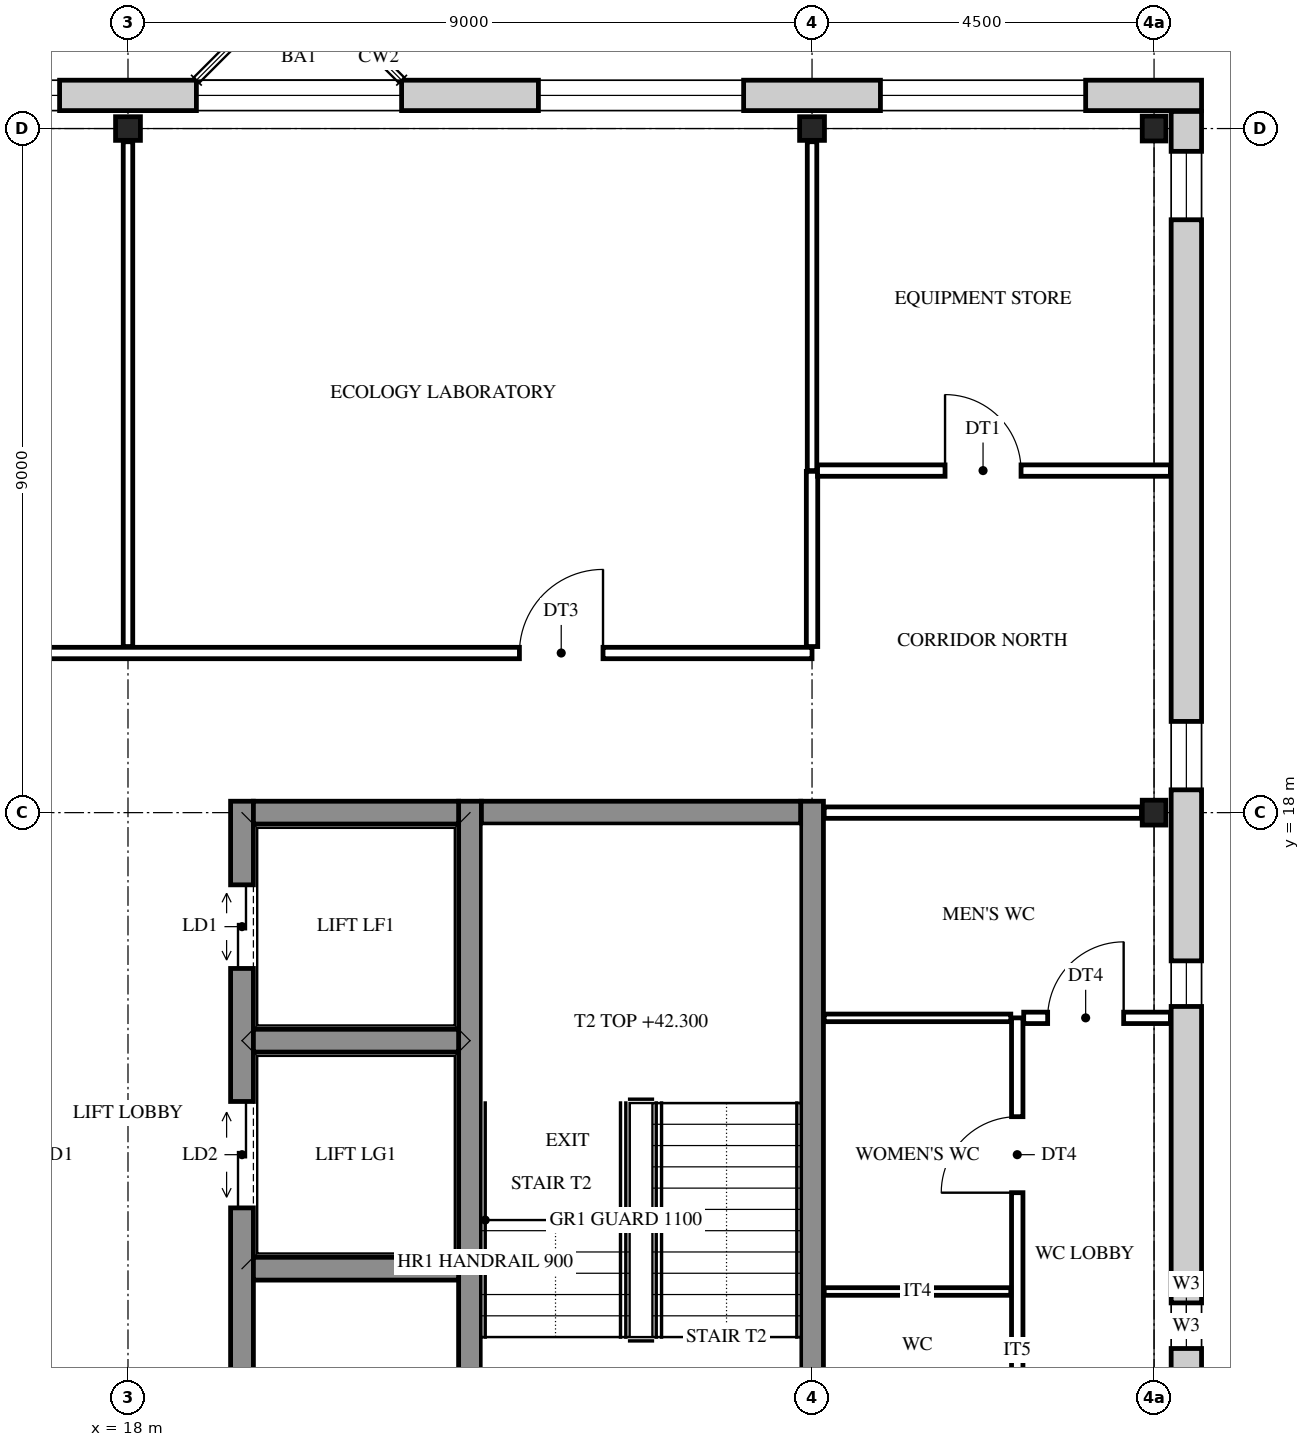
"""IFC4 building model, lengths in metres.
Left out: names, types, materials, properties, quantities, classifications, styles, units other than length and angle.
Written with IfcOpenShell. Run it as: python <this file> out.ifc"""

import sys

from ifc_helpers import new_model, si_unit, direction, frame, frame_2d, origin, origin_2d, place, context, subcontext, project, spatial, rectangle, i_section, extrude, element, fill, save


model = new_model("IFC4")
c1 = context("Model", 3, precision=1e-05, world=origin(), true_north=direction((0.0, 1.0)))
c2 = subcontext(c1, "Body", "Model", "MODEL_VIEW")
j1 = project(units=[si_unit("LENGTHUNIT", "METRE"), si_unit("PLANEANGLEUNIT", "RADIAN")], contexts=[c1])
p1 = place(None, origin())
s1 = spatial("IfcSite", under=j1, at=p1, CompositionType="ELEMENT")
p2 = place(p1, origin())
s2 = spatial("IfcBuilding", under=s1, at=p2, CompositionType="ELEMENT")
p3 = place(p2, frame((0.0, 0.0, 40.2)))
s3 = spatial("IfcBuildingStorey", under=s2, at=p3, CompositionType="ELEMENT", Elevation=40.2)
for number, where, z_axis, x_axis in (
    (1, (18.0, 27.0, 0.0), (0.0, 0.0, 1.0), (0.0, 1.0, 0.0)),
    (2, (27.0, 27.0, 0.0), (0.0, 0.0, 1.0), (0.0, 1.0, 0.0)),
    (3, (31.5, 18.0, 0.0), (0.0, 0.0, 1.0), (1.0, 0.0, 0.0)),
    (4, (31.5, 27.0, 0.0), (0.0, 0.0, 1.0), (1.0, 0.0, 0.0)),
):
    element("IfcColumn", number, at=place(p3, frame(where, z_axis=z_axis, x_axis=x_axis)), inside=s3, PredefinedType="COLUMN", context=c2, shape_type="SweptSolid", body=[
        extrude(i_section(OverallWidth=0.311, OverallDepth=0.327, WebThickness=0.016, FlangeThickness=0.025, FilletRadius=0.017, at=origin_2d()), origin(), (0.0, 0.0, 1.0), 4.2),
    ])
p4 = place(p3, frame((19.5, 8.85, 0.0), z_axis=(0.0, 0.0, 1.0), x_axis=(0.0, 1.0, 0.0)))
e5 = element("IfcWall", 5, at=p4, inside=s3, PredefinedType="SHEAR", context=c2, shape_type="SweptSolid", body=[
    extrude(rectangle(XDim=9.3, YDim=0.3, at=frame_2d((4.65, 0.0))), origin(), (0.0, 0.0, 1.0), 4.2),
])
p5 = place(p4, frame((3.95, 0.0, 0.0)))
e6 = element("IfcOpeningElement", 6, at=p5, cuts=e5, PredefinedType="OPENING", context=c2, shape_type="SweptSolid", body=[
    extrude(rectangle(XDim=1.4, YDim=2.1, at=frame_2d((0.7, 1.05))), frame((0.0, 0.16, 0.0), z_axis=(0.0, -1.0, 0.0), x_axis=(1.0, 0.0, 0.0)), (0.0, 0.0, 1.0), 0.32),
])
p6 = place(p4, frame((7.1, 0.0, 0.0)))
e7 = element("IfcOpeningElement", 7, at=p6, cuts=e5, PredefinedType="OPENING", context=c2, shape_type="SweptSolid", body=[
    extrude(rectangle(XDim=1.1, YDim=2.1, at=frame_2d((0.55, 1.05))), frame((0.0, 0.16, 0.0), z_axis=(0.0, -1.0, 0.0), x_axis=(1.0, 0.0, 0.0)), (0.0, 0.0, 1.0), 0.32),
])
for number, where, z_axis, x_axis in (
    (8, (22.5, 8.85, 0.0), (0.0, 0.0, 1.0), (0.0, 1.0, 0.0)),
    (9, (27.0, 8.85, 0.0), (0.0, 0.0, 1.0), (0.0, 1.0, 0.0)),
):
    element("IfcWall", number, at=place(p3, frame(where, z_axis=z_axis, x_axis=x_axis)), inside=s3, PredefinedType="SHEAR", context=c2, shape_type="SweptSolid", body=[
        extrude(rectangle(XDim=9.3, YDim=0.3, at=frame_2d((4.65, 0.0))), origin(), (0.0, 0.0, 1.0), 4.2),
    ])
for number, where, z_axis, x_axis in (
    (10, (19.65, 12.0, 0.0), (0.0, 0.0, 1.0), (1.0, 0.0, 0.0)),
    (11, (19.65, 15.0, 0.0), (0.0, 0.0, 1.0), (1.0, 0.0, 0.0)),
    (12, (19.65, 18.0, 0.0), (0.0, 0.0, 1.0), (1.0, 0.0, 0.0)),
):
    element("IfcWall", number, at=place(p3, frame(where, z_axis=z_axis, x_axis=x_axis)), inside=s3, PredefinedType="SHEAR", context=c2, shape_type="SweptSolid", body=[
        extrude(rectangle(XDim=2.7, YDim=0.3, at=frame_2d((1.35, 0.0))), origin(), (0.0, 0.0, 1.0), 4.2),
    ])
p7 = place(p3, frame((22.65, 18.0, 0.0), z_axis=(0.0, 0.0, 1.0), x_axis=(1.0, 0.0, 0.0)))
e13 = element("IfcWall", 13, at=p7, inside=s3, PredefinedType="SHEAR", context=c2, shape_type="SweptSolid", body=[
    extrude(rectangle(XDim=4.2, YDim=0.3, at=frame_2d((2.1, 0.0))), origin(), (0.0, 0.0, 1.0), 4.2),
])
p8 = place(p3, frame((-0.625, 27.436, 0.0), z_axis=(0.0, 0.0, 1.0), x_axis=(1.0, 0.0, 0.0)))
e14 = element("IfcWall", 14, at=p8, inside=s3, PredefinedType="STANDARD", context=c2, shape_type="SweptSolid", body=[
    extrude(rectangle(XDim=32.75, YDim=0.4, at=frame_2d((16.375, 0.0))), origin(), (0.0, 0.0, 1.0), 4.2),
])
p9 = place(p8, frame((1.525, 0.0, 0.9)))
e15 = element("IfcOpeningElement", 15, at=p9, cuts=e14, PredefinedType="OPENING", context=c2, shape_type="SweptSolid", body=[
    extrude(rectangle(XDim=2.7, YDim=2.5, at=frame_2d((1.35, 1.25))), frame((0.0, 0.21, 0.0), z_axis=(0.0, -1.0, 0.0), x_axis=(1.0, 0.0, 0.0)), (0.0, 0.0, 1.0), 0.42),
])
p10 = place(p8, frame((6.025, 0.0, 0.9)))
e16 = element("IfcOpeningElement", 16, at=p10, cuts=e14, PredefinedType="OPENING", context=c2, shape_type="SweptSolid", body=[
    extrude(rectangle(XDim=2.7, YDim=2.5, at=frame_2d((1.35, 1.25))), frame((0.0, 0.21, 0.0), z_axis=(0.0, -1.0, 0.0), x_axis=(1.0, 0.0, 0.0)), (0.0, 0.0, 1.0), 0.42),
])
p11 = place(p8, frame((10.525, 0.0, 0.9)))
e17 = element("IfcOpeningElement", 17, at=p11, cuts=e14, PredefinedType="OPENING", context=c2, shape_type="SweptSolid", body=[
    extrude(rectangle(XDim=2.7, YDim=2.5, at=frame_2d((1.35, 1.25))), frame((0.0, 0.21, 0.0), z_axis=(0.0, -1.0, 0.0), x_axis=(1.0, 0.0, 0.0)), (0.0, 0.0, 1.0), 0.42),
])
p12 = place(p8, frame((15.025, 0.0, 0.9)))
e18 = element("IfcOpeningElement", 18, at=p12, cuts=e14, PredefinedType="OPENING", context=c2, shape_type="SweptSolid", body=[
    extrude(rectangle(XDim=2.7, YDim=2.5, at=frame_2d((1.35, 1.25))), frame((0.0, 0.21, 0.0), z_axis=(0.0, -1.0, 0.0), x_axis=(1.0, 0.0, 0.0)), (0.0, 0.0, 1.0), 0.42),
])
p13 = place(p8, frame((19.525, 0.0, 0.9)))
e19 = element("IfcOpeningElement", 19, at=p13, cuts=e14, PredefinedType="OPENING", context=c2, shape_type="SweptSolid", body=[
    extrude(rectangle(XDim=2.7, YDim=2.5, at=frame_2d((1.35, 1.25))), frame((0.0, 0.21, 0.0), z_axis=(0.0, -1.0, 0.0), x_axis=(1.0, 0.0, 0.0)), (0.0, 0.0, 1.0), 0.42),
])
p14 = place(p8, frame((24.025, 0.0, 0.9)))
e20 = element("IfcOpeningElement", 20, at=p14, cuts=e14, PredefinedType="OPENING", context=c2, shape_type="SweptSolid", body=[
    extrude(rectangle(XDim=2.7, YDim=2.5, at=frame_2d((1.35, 1.25))), frame((0.0, 0.21, 0.0), z_axis=(0.0, -1.0, 0.0), x_axis=(1.0, 0.0, 0.0)), (0.0, 0.0, 1.0), 0.42),
])
p15 = place(p8, frame((28.525, 0.0, 0.9)))
e21 = element("IfcOpeningElement", 21, at=p15, cuts=e14, PredefinedType="OPENING", context=c2, shape_type="SweptSolid", body=[
    extrude(rectangle(XDim=2.7, YDim=2.5, at=frame_2d((1.35, 1.25))), frame((0.0, 0.21, 0.0), z_axis=(0.0, -1.0, 0.0), x_axis=(1.0, 0.0, 0.0)), (0.0, 0.0, 1.0), 0.42),
])
p16 = place(p3, frame((31.925, 27.225, 0.0), z_axis=(0.0, 0.0, 1.0), x_axis=(0.0, -1.0, 0.0)))
e22 = element("IfcWall", 22, at=p16, inside=s3, PredefinedType="STANDARD", context=c2, shape_type="SweptSolid", body=[
    extrude(rectangle(XDim=27.45, YDim=0.4, at=frame_2d((13.725, 0.0))), origin(), (0.0, 0.0, 1.0), 4.2),
])
p17 = place(p16, frame((26.025, 0.0, 0.9)))
e23 = element("IfcOpeningElement", 23, at=p17, cuts=e22, PredefinedType="OPENING", context=c2, shape_type="SweptSolid", body=[
    extrude(rectangle(XDim=0.9, YDim=2.0, at=frame_2d((0.45, 1.0))), frame((0.0, 0.21, 0.0), z_axis=(0.0, -1.0, 0.0), x_axis=(1.0, 0.0, 0.0)), (0.0, 0.0, 1.0), 0.42),
])
p18 = place(p16, frame((18.525, 0.0, 0.9)))
e24 = element("IfcOpeningElement", 24, at=p18, cuts=e22, PredefinedType="OPENING", context=c2, shape_type="SweptSolid", body=[
    extrude(rectangle(XDim=0.9, YDim=2.0, at=frame_2d((0.45, 1.0))), frame((0.0, 0.21, 0.0), z_axis=(0.0, -1.0, 0.0), x_axis=(1.0, 0.0, 0.0)), (0.0, 0.0, 1.0), 0.42),
])
p19 = place(p16, frame((15.675, 0.0, 1.6)))
e25 = element("IfcOpeningElement", 25, at=p19, cuts=e22, PredefinedType="OPENING", context=c2, shape_type="SweptSolid", body=[
    extrude(rectangle(XDim=0.6, YDim=0.9, at=frame_2d((0.3, 0.45))), frame((0.0, 0.21, 0.0), z_axis=(0.0, -1.0, 0.0), x_axis=(1.0, 0.0, 0.0)), (0.0, 0.0, 1.0), 0.42),
])
p20 = place(p16, frame((11.175, 0.0, 1.6)))
e26 = element("IfcOpeningElement", 26, at=p20, cuts=e22, PredefinedType="OPENING", context=c2, shape_type="SweptSolid", body=[
    extrude(rectangle(XDim=0.6, YDim=0.9, at=frame_2d((0.3, 0.45))), frame((0.0, 0.21, 0.0), z_axis=(0.0, -1.0, 0.0), x_axis=(1.0, 0.0, 0.0)), (0.0, 0.0, 1.0), 0.42),
])
p21 = place(p16, frame((8.025, 0.0, 0.9)))
e27 = element("IfcOpeningElement", 27, at=p21, cuts=e22, PredefinedType="OPENING", context=c2, shape_type="SweptSolid", body=[
    extrude(rectangle(XDim=0.9, YDim=2.0, at=frame_2d((0.45, 1.0))), frame((0.0, 0.21, 0.0), z_axis=(0.0, -1.0, 0.0), x_axis=(1.0, 0.0, 0.0)), (0.0, 0.0, 1.0), 0.42),
])
p22 = place(p16, frame((0.525, 0.0, 0.9)))
e28 = element("IfcOpeningElement", 28, at=p22, cuts=e22, PredefinedType="OPENING", context=c2, shape_type="SweptSolid", body=[
    extrude(rectangle(XDim=0.9, YDim=2.0, at=frame_2d((0.45, 1.0))), frame((0.0, 0.21, 0.0), z_axis=(0.0, -1.0, 0.0), x_axis=(1.0, 0.0, 0.0)), (0.0, 0.0, 1.0), 0.42),
])
p23 = place(p3, frame((18.0, 20.185, 0.0), z_axis=(0.0, 0.0, 1.0), x_axis=(0.0, 1.0, 0.0)))
e29 = element("IfcWall", 29, at=p23, inside=s3, PredefinedType="PARTITIONING", context=c2, shape_type="SweptSolid", body=[
    extrude(rectangle(XDim=6.641, YDim=0.125, at=frame_2d((3.321, 0.0))), origin(), (0.0, 0.0, 1.0), 3.537),
])
p24 = place(p3, frame((27.0, 20.185, 0.0), z_axis=(0.0, 0.0, 1.0), x_axis=(0.0, 1.0, 0.0)))
e30 = element("IfcWall", 30, at=p24, inside=s3, PredefinedType="PARTITIONING", context=c2, shape_type="SweptSolid", body=[
    extrude(rectangle(XDim=2.305, YDim=0.15, at=frame_2d((1.152, 0.0))), origin(), (0.0, 0.0, 1.0), 3.537),
])
p25 = place(p3, frame((27.0, 22.5, 0.0), z_axis=(0.0, 0.0, 1.0), x_axis=(0.0, 1.0, 0.0)))
e31 = element("IfcWall", 31, at=p25, inside=s3, PredefinedType="PARTITIONING", context=c2, shape_type="SweptSolid", body=[
    extrude(rectangle(XDim=4.326, YDim=0.125, at=frame_2d((2.163, 0.0))), origin(), (0.0, 0.0, 1.0), 3.537),
])
p26 = place(p3, frame((29.7, 9.0, 0.0), z_axis=(0.0, 0.0, 1.0), x_axis=(0.0, 1.0, 0.0)))
e32 = element("IfcWall", 32, at=p26, inside=s3, PredefinedType="PARTITIONING", context=c2, shape_type="SweptSolid", body=[
    extrude(rectangle(XDim=6.3, YDim=0.15, at=frame_2d((3.15, 0.0))), origin(), (0.0, 0.0, 1.0), 3.537),
])
p27 = place(p26, frame((4.0, 0.0, 0.0)))
e33 = element("IfcOpeningElement", 33, at=p27, cuts=e32, PredefinedType="OPENING", context=c2, shape_type="SweptSolid", body=[
    extrude(rectangle(XDim=1.0, YDim=2.1, at=frame_2d((0.5, 1.05))), frame((0.0, 0.085, 0.0), z_axis=(0.0, -1.0, 0.0), x_axis=(1.0, 0.0, 0.0)), (0.0, 0.0, 1.0), 0.17),
])
for number, where, z_axis, x_axis in (
    (34, (27.16, 11.7, 0.0), (0.0, 0.0, 1.0), (1.0, 0.0, 0.0)),
    (35, (27.16, 15.3, 0.0), (0.0, 0.0, 1.0), (1.0, 0.0, 0.0)),
):
    element("IfcWall", number, at=place(p3, frame(where, z_axis=z_axis, x_axis=x_axis)), inside=s3, PredefinedType="PARTITIONING", context=c2, shape_type="SweptSolid", body=[
        extrude(rectangle(XDim=2.455, YDim=0.1, at=frame_2d((1.228, 0.0))), origin(), (0.0, 0.0, 1.0), 3.537),
    ])
p28 = place(p3, frame((29.785, 15.3, 0.0), z_axis=(0.0, 0.0, 1.0), x_axis=(1.0, 0.0, 0.0)))
e36 = element("IfcWall", 36, at=p28, inside=s3, PredefinedType="PARTITIONING", context=c2, shape_type="SweptSolid", body=[
    extrude(rectangle(XDim=1.93, YDim=0.15, at=frame_2d((0.965, 0.0))), origin(), (0.0, 0.0, 1.0), 3.537),
])
p29 = place(p28, frame((0.315, 0.0, 0.0)))
e37 = element("IfcOpeningElement", 37, at=p29, cuts=e36, PredefinedType="OPENING", context=c2, shape_type="SweptSolid", body=[
    extrude(rectangle(XDim=1.0, YDim=2.1, at=frame_2d((0.5, 1.05))), frame((0.0, 0.085, 0.0), z_axis=(0.0, -1.0, 0.0), x_axis=(1.0, 0.0, 0.0)), (0.0, 0.0, 1.0), 0.17),
])
p30 = place(p3, frame((27.16, 18.0, 0.0), z_axis=(0.0, 0.0, 1.0), x_axis=(1.0, 0.0, 0.0)))
e38 = element("IfcWall", 38, at=p30, inside=s3, PredefinedType="PARTITIONING", context=c2, shape_type="SweptSolid", body=[
    extrude(rectangle(XDim=4.175, YDim=0.15, at=frame_2d((2.087, 0.0))), origin(), (0.0, 0.0, 1.0), 3.537),
])
p31 = place(p3, frame((6.9, 20.1, 0.0), z_axis=(0.0, 0.0, 1.0), x_axis=(1.0, 0.0, 0.0)))
e39 = element("IfcWall", 39, at=p31, inside=s3, PredefinedType="PARTITIONING", context=c2, shape_type="SweptSolid", body=[
    extrude(rectangle(XDim=20.1, YDim=0.15, at=frame_2d((10.05, 0.0))), origin(), (0.0, 0.0, 1.0), 3.537),
])
p32 = place(p31, frame((7.25, 0.0, 0.0)))
e40 = element("IfcOpeningElement", 40, at=p32, cuts=e39, PredefinedType="OPENING", context=c2, shape_type="SweptSolid", body=[
    extrude(rectangle(XDim=1.1, YDim=2.1, at=frame_2d((0.55, 1.05))), frame((0.0, 0.085, 0.0), z_axis=(0.0, -1.0, 0.0), x_axis=(1.0, 0.0, 0.0)), (0.0, 0.0, 1.0), 0.17),
])
p33 = place(p31, frame((0.65, 0.0, 0.0)))
e41 = element("IfcOpeningElement", 41, at=p33, cuts=e39, PredefinedType="OPENING", context=c2, shape_type="SweptSolid", body=[
    extrude(rectangle(XDim=1.1, YDim=2.1, at=frame_2d((0.55, 1.05))), frame((0.0, 0.085, 0.0), z_axis=(0.0, -1.0, 0.0), x_axis=(1.0, 0.0, 0.0)), (0.0, 0.0, 1.0), 0.17),
])
p34 = place(p31, frame((16.25, 0.0, 0.0)))
e42 = element("IfcOpeningElement", 42, at=p34, cuts=e39, PredefinedType="OPENING", context=c2, shape_type="SweptSolid", body=[
    extrude(rectangle(XDim=1.1, YDim=2.1, at=frame_2d((0.55, 1.05))), frame((0.0, 0.085, 0.0), z_axis=(0.0, -1.0, 0.0), x_axis=(1.0, 0.0, 0.0)), (0.0, 0.0, 1.0), 0.17),
])
p35 = place(p3, frame((27.073, 22.5, 0.0), z_axis=(0.0, 0.0, 1.0), x_axis=(1.0, 0.0, 0.0)))
e43 = element("IfcWall", 43, at=p35, inside=s3, PredefinedType="PARTITIONING", context=c2, shape_type="SweptSolid", body=[
    extrude(rectangle(XDim=4.643, YDim=0.15, at=frame_2d((2.321, 0.0))), origin(), (0.0, 0.0, 1.0), 3.537),
])
p36 = place(p35, frame((1.677, 0.0, 0.0)))
e44 = element("IfcOpeningElement", 44, at=p36, cuts=e43, PredefinedType="OPENING", context=c2, shape_type="SweptSolid", body=[
    extrude(rectangle(XDim=1.0, YDim=2.1, at=frame_2d((0.5, 1.05))), frame((0.0, 0.085, 0.0), z_axis=(0.0, -1.0, 0.0), x_axis=(1.0, 0.0, 0.0)), (0.0, 0.0, 1.0), 0.17),
])
p37 = place(p12, origin())
e45 = element("IfcWindow", 45, at=p37, inside=s3, PartitioningType="SINGLE_PANEL", PredefinedType="WINDOW", context=c2, shape_type="SweptSolid", body=[
    extrude(rectangle(XDim=2.7, YDim=2.5, at=frame_2d((1.35, 1.25))), frame((0.0, 0.03, 0.0), z_axis=(0.0, -1.0, 0.0), x_axis=(1.0, 0.0, 0.0)), (0.0, 0.0, 1.0), 0.06),
])
fill(e18, e45)
p38 = place(p13, origin())
e46 = element("IfcWindow", 46, at=p38, inside=s3, PartitioningType="SINGLE_PANEL", PredefinedType="WINDOW", context=c2, shape_type="SweptSolid", body=[
    extrude(rectangle(XDim=2.7, YDim=2.5, at=frame_2d((1.35, 1.25))), frame((0.0, 0.03, 0.0), z_axis=(0.0, -1.0, 0.0), x_axis=(1.0, 0.0, 0.0)), (0.0, 0.0, 1.0), 0.06),
])
fill(e19, e46)
p39 = place(p14, origin())
e47 = element("IfcWindow", 47, at=p39, inside=s3, PartitioningType="SINGLE_PANEL", PredefinedType="WINDOW", context=c2, shape_type="SweptSolid", body=[
    extrude(rectangle(XDim=2.7, YDim=2.5, at=frame_2d((1.35, 1.25))), frame((0.0, 0.03, 0.0), z_axis=(0.0, -1.0, 0.0), x_axis=(1.0, 0.0, 0.0)), (0.0, 0.0, 1.0), 0.06),
])
fill(e20, e47)
p40 = place(p15, origin())
e48 = element("IfcWindow", 48, at=p40, inside=s3, PartitioningType="SINGLE_PANEL", PredefinedType="WINDOW", context=c2, shape_type="SweptSolid", body=[
    extrude(rectangle(XDim=2.7, YDim=2.5, at=frame_2d((1.35, 1.25))), frame((0.0, 0.03, 0.0), z_axis=(0.0, -1.0, 0.0), x_axis=(1.0, 0.0, 0.0)), (0.0, 0.0, 1.0), 0.06),
])
fill(e21, e48)
p41 = place(p19, origin())
e49 = element("IfcWindow", 49, at=p41, inside=s3, PartitioningType="SINGLE_PANEL", PredefinedType="WINDOW", context=c2, shape_type="SweptSolid", body=[
    extrude(rectangle(XDim=0.6, YDim=0.9, at=frame_2d((0.3, 0.45))), frame((0.0, 0.03, 0.0), z_axis=(0.0, -1.0, 0.0), x_axis=(1.0, 0.0, 0.0)), (0.0, 0.0, 1.0), 0.06),
])
fill(e25, e49)
p42 = place(p20, origin())
e50 = element("IfcWindow", 50, at=p42, inside=s3, PartitioningType="SINGLE_PANEL", PredefinedType="WINDOW", context=c2, shape_type="SweptSolid", body=[
    extrude(rectangle(XDim=0.6, YDim=0.9, at=frame_2d((0.3, 0.45))), frame((0.0, 0.03, 0.0), z_axis=(0.0, -1.0, 0.0), x_axis=(1.0, 0.0, 0.0)), (0.0, 0.0, 1.0), 0.06),
])
fill(e26, e50)
p43 = place(p21, origin())
e51 = element("IfcWindow", 51, at=p43, inside=s3, PartitioningType="SINGLE_PANEL", PredefinedType="WINDOW", context=c2, shape_type="SweptSolid", body=[
    extrude(rectangle(XDim=0.9, YDim=2.0, at=frame_2d((0.45, 1.0))), frame((0.0, 0.03, 0.0), z_axis=(0.0, -1.0, 0.0), x_axis=(1.0, 0.0, 0.0)), (0.0, 0.0, 1.0), 0.06),
])
fill(e27, e51)
p44 = place(p22, origin())
e52 = element("IfcWindow", 52, at=p44, inside=s3, PartitioningType="SINGLE_PANEL", PredefinedType="WINDOW", context=c2, shape_type="SweptSolid", body=[
    extrude(rectangle(XDim=0.9, YDim=2.0, at=frame_2d((0.45, 1.0))), frame((0.0, 0.03, 0.0), z_axis=(0.0, -1.0, 0.0), x_axis=(1.0, 0.0, 0.0)), (0.0, 0.0, 1.0), 0.06),
])
fill(e28, e52)
p45 = place(p27, origin())
e53 = element("IfcDoor", 53, at=p45, inside=s3, OperationType="SINGLE_SWING_LEFT", PredefinedType="DOOR", context=c2, shape_type="SweptSolid", body=[
    extrude(rectangle(XDim=1.0, YDim=2.1, at=frame_2d((0.5, 1.05))), frame((0.0, 0.025, 0.0), z_axis=(0.0, -1.0, 0.0), x_axis=(1.0, 0.0, 0.0)), (0.0, 0.0, 1.0), 0.05),
])
fill(e33, e53)
p46 = place(p29, origin())
e54 = element("IfcDoor", 54, at=p46, inside=s3, OperationType="SINGLE_SWING_RIGHT", PredefinedType="DOOR", context=c2, shape_type="SweptSolid", body=[
    extrude(rectangle(XDim=1.0, YDim=2.1, at=frame_2d((0.5, 1.05))), frame((0.0, 0.025, 0.0), z_axis=(0.0, -1.0, 0.0), x_axis=(1.0, 0.0, 0.0)), (0.0, 0.0, 1.0), 0.05),
])
fill(e37, e54)
p47 = place(p34, origin())
e55 = element("IfcDoor", 55, at=p47, inside=s3, OperationType="SINGLE_SWING_RIGHT", PredefinedType="DOOR", context=c2, shape_type="SweptSolid", body=[
    extrude(rectangle(XDim=1.1, YDim=2.1, at=frame_2d((0.55, 1.05))), frame((0.0, 0.025, 0.0), z_axis=(0.0, -1.0, 0.0), x_axis=(1.0, 0.0, 0.0)), (0.0, 0.0, 1.0), 0.05),
])
fill(e42, e55)
p48 = place(p36, origin())
e56 = element("IfcDoor", 56, at=p48, inside=s3, OperationType="SINGLE_SWING_LEFT", PredefinedType="DOOR", context=c2, shape_type="SweptSolid", body=[
    extrude(rectangle(XDim=1.0, YDim=2.1, at=frame_2d((0.5, 1.05))), frame((0.0, 0.025, 0.0), z_axis=(0.0, -1.0, 0.0), x_axis=(1.0, 0.0, 0.0)), (0.0, 0.0, 1.0), 0.05),
])
fill(e44, e56)
p49 = place(p5, origin())
e57 = element("IfcDoor", 57, at=p49, inside=s3, OperationType="DOUBLE_DOOR_SLIDING", PredefinedType="DOOR", context=c2, shape_type="SweptSolid", body=[
    extrude(rectangle(XDim=1.4, YDim=2.1, at=frame_2d((0.7, 1.05))), frame((0.0, 0.025, 0.0), z_axis=(0.0, -1.0, 0.0), x_axis=(1.0, 0.0, 0.0)), (0.0, 0.0, 1.0), 0.05),
])
fill(e6, e57)
p50 = place(p6, origin())
e58 = element("IfcDoor", 58, at=p50, inside=s3, OperationType="DOUBLE_DOOR_SLIDING", PredefinedType="DOOR", context=c2, shape_type="SweptSolid", body=[
    extrude(rectangle(XDim=1.1, YDim=2.1, at=frame_2d((0.55, 1.05))), frame((0.0, 0.025, 0.0), z_axis=(0.0, -1.0, 0.0), x_axis=(1.0, 0.0, 0.0)), (0.0, 0.0, 1.0), 0.05),
])
fill(e7, e58)
save(model, sys.argv[1])
